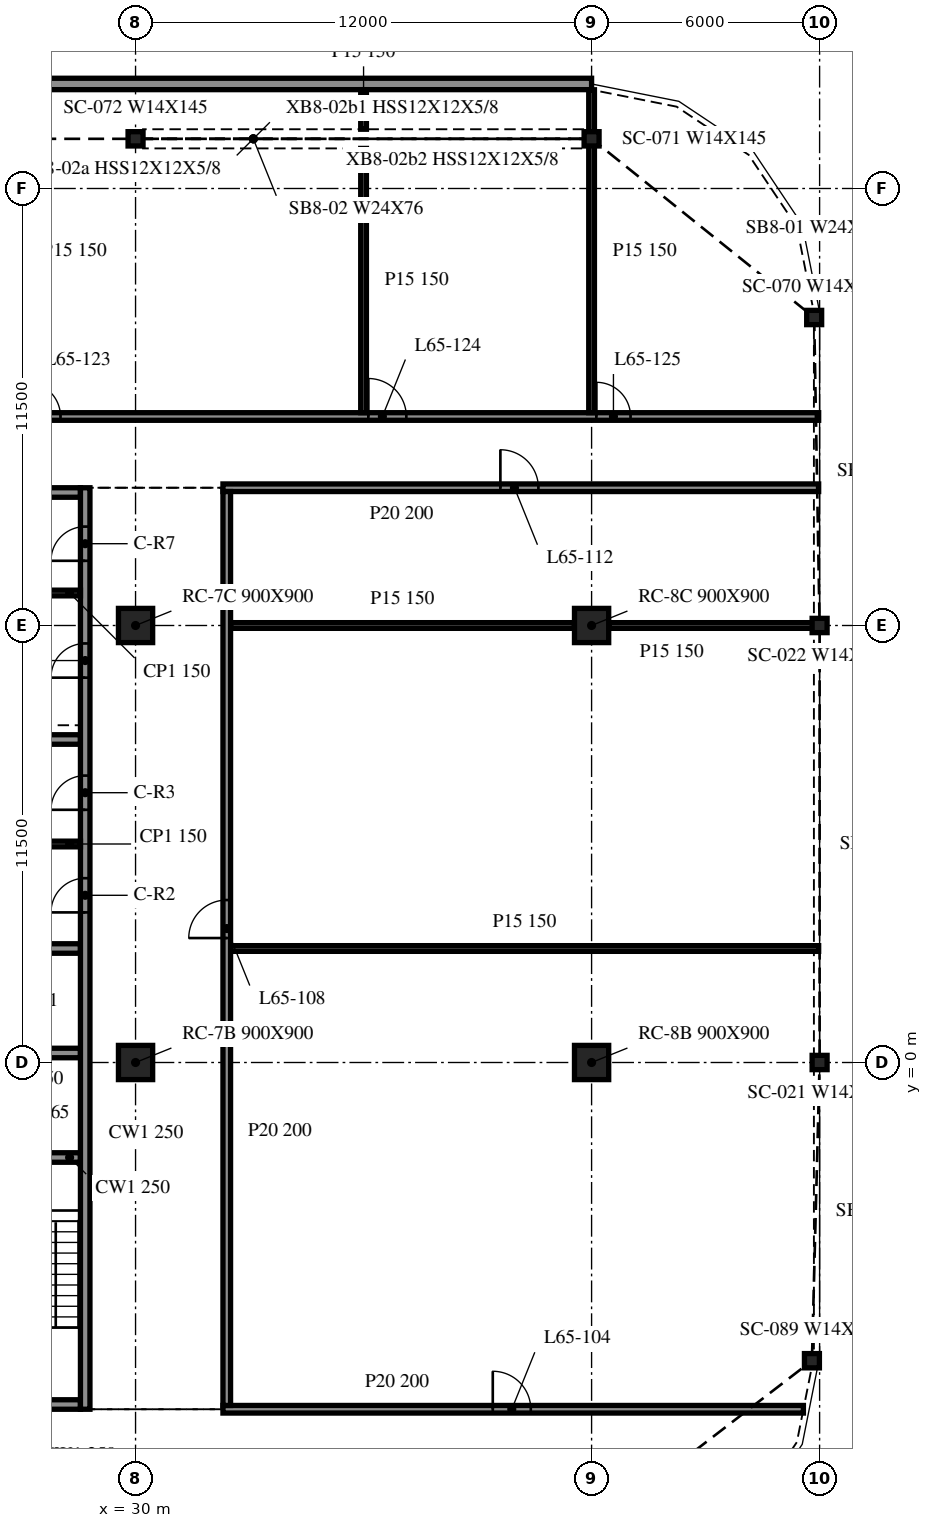
"""IFC4 building model, lengths in metres.
Left out: names, types, materials, properties, quantities, classifications, styles, units other than length and angle.
Written with IfcOpenShell. Run it as: python <this file> out.ifc"""

import sys

from ifc_helpers import new_model, si_unit, direction, frame, frame_2d, origin, origin_2d, place, context, subcontext, project, spatial, rectangle, i_section, extrude, element, fill, save


model = new_model("IFC4")
c1 = context("Model", 3, precision=1e-05, world=origin(), true_north=direction((0.0, 1.0)))
c2 = subcontext(c1, "Body", "Model", "MODEL_VIEW")
j1 = project(units=[si_unit("LENGTHUNIT", "METRE"), si_unit("PLANEANGLEUNIT", "RADIAN")], contexts=[c1])
p1 = place(None, origin())
s1 = spatial("IfcSite", under=j1, at=p1, CompositionType="ELEMENT")
p2 = place(p1, origin())
s2 = spatial("IfcBuilding", under=s1, at=p2, CompositionType="ELEMENT")
p3 = place(p2, frame((0.0, 0.0, 267.1)))
s3 = spatial("IfcBuildingStorey", under=s2, at=p3, CompositionType="ELEMENT", Elevation=267.1)
for number, where, z_axis, x_axis in (
    (1, (30.0, 0.0, -0.34), (0.0, 0.0, 1.0), (1.0, 0.0, 0.0)),
    (2, (30.0, 11.5, -0.34), (0.0, 0.0, 1.0), (1.0, 0.0, 0.0)),
    (3, (42.0, 0.0, -0.34), (0.0, 0.0, 1.0), (1.0, 0.0, 0.0)),
    (4, (42.0, 11.5, -0.34), (0.0, 0.0, 1.0), (1.0, 0.0, 0.0)),
):
    element("IfcColumn", number, at=place(p3, frame(where, z_axis=z_axis, x_axis=x_axis)), inside=s3, PredefinedType="COLUMN", context=c2, shape_type="SweptSolid", body=[
        extrude(rectangle(XDim=0.9, YDim=0.9, at=origin_2d()), origin(), (0.0, 0.0, 1.0), 3.8),
    ])
for number, where, z_axis, x_axis in (
    (5, (47.857, 19.605, -0.34), (0.0, 0.0, 1.0), (1.0, 0.0, 0.0)),
    (6, (42.0, 24.307, -0.34), (0.0, 0.0, 1.0), (1.0, 0.0, 0.0)),
    (7, (30.0, 24.307, -0.34), (0.0, 0.0, 1.0), (1.0, 0.0, 0.0)),
    (8, (47.798, -7.848, -0.34), (0.0, 0.0, 1.0), (1.0, 0.0, 0.0)),
    (9, (48.0, 0.0, -0.34), (0.0, 0.0, 1.0), (1.0, 0.0, 0.0)),
    (10, (48.0, 11.5, -0.34), (0.0, 0.0, 1.0), (1.0, 0.0, 0.0)),
):
    element("IfcColumn", number, at=place(p3, frame(where, z_axis=z_axis, x_axis=x_axis)), inside=s3, PredefinedType="COLUMN", context=c2, shape_type="SweptSolid", body=[
        extrude(i_section(OverallWidth=0.394, OverallDepth=0.376, WebThickness=0.017, FlangeThickness=0.028, at=origin_2d()), origin(), (0.0, 0.0, 1.0), 3.8),
    ])
p4 = place(p3, frame((42.0, 25.751, 0.0), z_axis=(0.0, 0.0, 1.0), x_axis=(-1.0, 0.0, 0.0)))
e11 = element("IfcWall", 11, at=p4, inside=s3, PredefinedType="NOTDEFINED", context=c2, shape_type="SweptSolid", body=[
    extrude(rectangle(XDim=84.0, YDim=0.3, at=frame_2d((42.0, 0.0))), origin(), (0.0, 0.0, 1.0), 2.853),
])
p5 = place(p3, frame((28.675, -9.125, 0.0), z_axis=(0.0, 0.0, 1.0), x_axis=(0.0, 1.0, 0.0)))
e12 = element("IfcWall", 12, at=p5, inside=s3, PredefinedType="SOLIDWALL", context=c2, shape_type="SweptSolid", body=[
    extrude(rectangle(XDim=24.25, YDim=0.25, at=frame_2d((12.125, 0.0))), origin(), (0.0, 0.0, 1.0), 3.46),
])
p6 = place(p5, frame((13.075, 0.0, 0.0)))
e13 = element("IfcOpeningElement", 13, at=p6, cuts=e12, PredefinedType="OPENING", context=c2, shape_type="SweptSolid", body=[
    extrude(rectangle(XDim=0.9, YDim=2.1, at=frame_2d((0.45, 1.05))), frame((0.0, 0.135, 0.0), z_axis=(0.0, -1.0, 0.0), x_axis=(1.0, 0.0, 0.0)), (0.0, 0.0, 1.0), 0.27),
])
p7 = place(p5, frame((15.775, 0.0, 0.0)))
e14 = element("IfcOpeningElement", 14, at=p7, cuts=e12, PredefinedType="OPENING", context=c2, shape_type="SweptSolid", body=[
    extrude(rectangle(XDim=0.9, YDim=2.1, at=frame_2d((0.45, 1.05))), frame((0.0, 0.135, 0.0), z_axis=(0.0, -1.0, 0.0), x_axis=(1.0, 0.0, 0.0)), (0.0, 0.0, 1.0), 0.27),
])
p8 = place(p5, frame((19.252, 0.0, 0.0)))
e15 = element("IfcOpeningElement", 15, at=p8, cuts=e12, PredefinedType="OPENING", context=c2, shape_type="SweptSolid", body=[
    extrude(rectangle(XDim=0.9, YDim=2.1, at=frame_2d((0.45, 1.05))), frame((0.0, 0.135, 0.0), z_axis=(0.0, -1.0, 0.0), x_axis=(1.0, 0.0, 0.0)), (0.0, 0.0, 1.0), 0.27),
])
p9 = place(p5, frame((22.327, 0.0, 0.0)))
e16 = element("IfcOpeningElement", 16, at=p9, cuts=e12, PredefinedType="OPENING", context=c2, shape_type="SweptSolid", body=[
    extrude(rectangle(XDim=0.9, YDim=2.1, at=frame_2d((0.45, 1.05))), frame((0.0, 0.135, 0.0), z_axis=(0.0, -1.0, 0.0), x_axis=(1.0, 0.0, 0.0)), (0.0, 0.0, 1.0), 0.27),
])
p10 = place(p3, frame((28.55, -9.0, 0.0), z_axis=(0.0, 0.0, 1.0), x_axis=(-1.0, 0.0, 0.0)))
e17 = element("IfcWall", 17, at=p10, inside=s3, PredefinedType="SOLIDWALL", context=c2, shape_type="SweptSolid", body=[
    extrude(rectangle(XDim=9.1, YDim=0.25, at=frame_2d((4.55, 0.0))), origin(), (0.0, 0.0, 1.0), 3.46),
])
p11 = place(p10, frame((3.65, 0.0, 0.0)))
e18 = element("IfcOpeningElement", 18, at=p11, cuts=e17, PredefinedType="OPENING", context=c2, shape_type="SweptSolid", body=[
    extrude(rectangle(XDim=1.8, YDim=2.1, at=frame_2d((0.9, 1.05))), frame((0.0, 0.135, 0.0), z_axis=(0.0, -1.0, 0.0), x_axis=(1.0, 0.0, 0.0)), (0.0, 0.0, 1.0), 0.27),
])
p12 = place(p3, frame((19.45, 15.0, 0.0), z_axis=(0.0, 0.0, 1.0), x_axis=(1.0, 0.0, 0.0)))
e19 = element("IfcWall", 19, at=p12, inside=s3, PredefinedType="SOLIDWALL", context=c2, shape_type="SweptSolid", body=[
    extrude(rectangle(XDim=9.1, YDim=0.25, at=frame_2d((4.55, 0.0))), origin(), (0.0, 0.0, 1.0), 3.46),
])
p13 = place(p12, frame((3.65, 0.0, 0.0)))
e20 = element("IfcOpeningElement", 20, at=p13, cuts=e19, PredefinedType="OPENING", context=c2, shape_type="SweptSolid", body=[
    extrude(rectangle(XDim=1.8, YDim=2.1, at=frame_2d((0.9, 1.05))), frame((0.0, 0.135, 0.0), z_axis=(0.0, -1.0, 0.0), x_axis=(1.0, 0.0, 0.0)), (0.0, 0.0, 1.0), 0.27),
])
for number, where, z_axis, x_axis in (
    (21, (25.7, -2.5, 0.0), (0.0, 0.0, 1.0), (1.0, 0.0, 0.0)),
    (22, (25.7, 0.25, 0.0), (0.0, 0.0, 1.0), (1.0, 0.0, 0.0)),
    (23, (25.7, 3.0, 0.0), (0.0, 0.0, 1.0), (1.0, 0.0, 0.0)),
    (24, (25.7, 8.5, 0.0), (0.0, 0.0, 1.0), (1.0, 0.0, 0.0)),
):
    element("IfcWall", number, at=place(p3, frame(where, z_axis=z_axis, x_axis=x_axis)), inside=s3, PredefinedType="SOLIDWALL", context=c2, shape_type="SweptSolid", body=[
        extrude(rectangle(XDim=2.85, YDim=0.25, at=frame_2d((1.425, 0.0))), origin(), (0.0, 0.0, 1.0), 3.46),
    ])
for number, where, z_axis, x_axis in (
    (25, (25.7, 5.75, 0.0), (0.0, 0.0, 1.0), (1.0, 0.0, 0.0)),
    (26, (25.7, 12.355, 0.0), (0.0, 0.0, 1.0), (1.0, 0.0, 0.0)),
):
    element("IfcWall", number, at=place(p3, frame(where, z_axis=z_axis, x_axis=x_axis)), inside=s3, PredefinedType="PARTITIONING", context=c2, shape_type="SweptSolid", body=[
        extrude(rectangle(XDim=2.85, YDim=0.15, at=frame_2d((1.425, 0.0))), origin(), (0.0, 0.0, 1.0), 3.46),
    ])
p14 = place(p3, frame((32.3, -9.125, 0.0), z_axis=(0.0, 0.0, 1.0), x_axis=(1.0, 0.0, 0.0)))
e27 = element("IfcWall", 27, at=p14, inside=s3, PredefinedType="PARTITIONING", context=c2, shape_type="SweptSolid", body=[
    extrude(rectangle(XDim=15.274, YDim=0.2, at=frame_2d((7.637, 0.0))), origin(), (0.0, 0.0, 1.0), 3.46),
])
p15 = place(p14, frame((7.1, 0.0, 0.0)))
e28 = element("IfcOpeningElement", 28, at=p15, cuts=e27, PredefinedType="OPENING", context=c2, shape_type="SweptSolid", body=[
    extrude(rectangle(XDim=1.0, YDim=2.1, at=frame_2d((0.5, 1.05))), frame((0.0, 0.11, 0.0), z_axis=(0.0, -1.0, 0.0), x_axis=(1.0, 0.0, 0.0)), (0.0, 0.0, 1.0), 0.22),
])
p16 = place(p3, frame((32.5, 3.0, 0.0), z_axis=(0.0, 0.0, 1.0), x_axis=(1.0, 0.0, 0.0)))
e29 = element("IfcWall", 29, at=p16, inside=s3, PredefinedType="PARTITIONING", context=c2, shape_type="SweptSolid", body=[
    extrude(rectangle(XDim=15.475, YDim=0.15, at=frame_2d((7.738, 0.0))), origin(), (0.0, 0.0, 1.0), 3.46),
])
p17 = place(p3, frame((32.5, 11.5, 0.0), z_axis=(0.0, 0.0, 1.0), x_axis=(1.0, 0.0, 0.0)))
e30 = element("IfcWall", 30, at=p17, inside=s3, PredefinedType="PARTITIONING", context=c2, shape_type="SweptSolid", body=[
    extrude(rectangle(XDim=9.05, YDim=0.15, at=frame_2d((4.525, 0.0))), origin(), (0.0, 0.0, 1.0), 3.46),
])
p18 = place(p3, frame((42.45, 11.5, 0.0), z_axis=(0.0, 0.0, 1.0), x_axis=(1.0, 0.0, 0.0)))
e31 = element("IfcWall", 31, at=p18, inside=s3, PredefinedType="PARTITIONING", context=c2, shape_type="SweptSolid", body=[
    extrude(rectangle(XDim=5.525, YDim=0.15, at=frame_2d((2.763, 0.0))), origin(), (0.0, 0.0, 1.0), 3.46),
])
p19 = place(p3, frame((32.3, 15.125, 0.0), z_axis=(0.0, 0.0, 1.0), x_axis=(1.0, 0.0, 0.0)))
e32 = element("IfcWall", 32, at=p19, inside=s3, PredefinedType="PARTITIONING", context=c2, shape_type="SweptSolid", body=[
    extrude(rectangle(XDim=15.675, YDim=0.2, at=frame_2d((7.837, 0.0))), origin(), (0.0, 0.0, 1.0), 3.46),
])
p20 = place(p19, frame((7.3, 0.0, 0.0)))
e33 = element("IfcOpeningElement", 33, at=p20, cuts=e32, PredefinedType="OPENING", context=c2, shape_type="SweptSolid", body=[
    extrude(rectangle(XDim=1.0, YDim=2.1, at=frame_2d((0.5, 1.05))), frame((0.0, 0.11, 0.0), z_axis=(0.0, -1.0, 0.0), x_axis=(1.0, 0.0, 0.0)), (0.0, 0.0, 1.0), 0.22),
])
p21 = place(p3, frame((-47.975, 17.0, 0.0), z_axis=(0.0, 0.0, 1.0), x_axis=(1.0, 0.0, 0.0)))
e34 = element("IfcWall", 34, at=p21, inside=s3, PredefinedType="PARTITIONING", context=c2, shape_type="SweptSolid", body=[
    extrude(rectangle(XDim=95.95, YDim=0.2, at=frame_2d((47.975, 0.0))), origin(), (0.0, 0.0, 1.0), 3.46),
])
p22 = place(p21, frame((10.7, 0.0, 0.0)))
e35 = element("IfcOpeningElement", 35, at=p22, cuts=e34, PredefinedType="OPENING", context=c2, shape_type="SweptSolid", body=[
    extrude(rectangle(XDim=0.9, YDim=2.1, at=frame_2d((0.45, 1.05))), frame((0.0, 0.11, 0.0), z_axis=(0.0, -1.0, 0.0), x_axis=(1.0, 0.0, 0.0)), (0.0, 0.0, 1.0), 0.22),
])
p23 = place(p21, frame((13.7, 0.0, 0.0)))
e36 = element("IfcOpeningElement", 36, at=p23, cuts=e34, PredefinedType="OPENING", context=c2, shape_type="SweptSolid", body=[
    extrude(rectangle(XDim=0.9, YDim=2.1, at=frame_2d((0.45, 1.05))), frame((0.0, 0.11, 0.0), z_axis=(0.0, -1.0, 0.0), x_axis=(1.0, 0.0, 0.0)), (0.0, 0.0, 1.0), 0.22),
])
p24 = place(p21, frame((22.5, 0.0, 0.0)))
e37 = element("IfcOpeningElement", 37, at=p24, cuts=e34, PredefinedType="OPENING", context=c2, shape_type="SweptSolid", body=[
    extrude(rectangle(XDim=1.0, YDim=2.1, at=frame_2d((0.5, 1.05))), frame((0.0, 0.11, 0.0), z_axis=(0.0, -1.0, 0.0), x_axis=(1.0, 0.0, 0.0)), (0.0, 0.0, 1.0), 0.22),
])
p25 = place(p21, frame((28.5, 0.0, 0.0)))
e38 = element("IfcOpeningElement", 38, at=p25, cuts=e34, PredefinedType="OPENING", context=c2, shape_type="SweptSolid", body=[
    extrude(rectangle(XDim=1.0, YDim=2.1, at=frame_2d((0.5, 1.05))), frame((0.0, 0.11, 0.0), z_axis=(0.0, -1.0, 0.0), x_axis=(1.0, 0.0, 0.0)), (0.0, 0.0, 1.0), 0.22),
])
p26 = place(p21, frame((40.7, 0.0, 0.0)))
e39 = element("IfcOpeningElement", 39, at=p26, cuts=e34, PredefinedType="OPENING", context=c2, shape_type="SweptSolid", body=[
    extrude(rectangle(XDim=0.9, YDim=2.1, at=frame_2d((0.45, 1.05))), frame((0.0, 0.11, 0.0), z_axis=(0.0, -1.0, 0.0), x_axis=(1.0, 0.0, 0.0)), (0.0, 0.0, 1.0), 0.22),
])
p27 = place(p21, frame((43.5, 0.0, 0.0)))
e40 = element("IfcOpeningElement", 40, at=p27, cuts=e34, PredefinedType="OPENING", context=c2, shape_type="SweptSolid", body=[
    extrude(rectangle(XDim=1.0, YDim=2.1, at=frame_2d((0.5, 1.05))), frame((0.0, 0.11, 0.0), z_axis=(0.0, -1.0, 0.0), x_axis=(1.0, 0.0, 0.0)), (0.0, 0.0, 1.0), 0.22),
])
p28 = place(p21, frame((47.3, 0.0, 0.0)))
e41 = element("IfcOpeningElement", 41, at=p28, cuts=e34, PredefinedType="OPENING", context=c2, shape_type="SweptSolid", body=[
    extrude(rectangle(XDim=0.9, YDim=2.1, at=frame_2d((0.45, 1.05))), frame((0.0, 0.11, 0.0), z_axis=(0.0, -1.0, 0.0), x_axis=(1.0, 0.0, 0.0)), (0.0, 0.0, 1.0), 0.22),
])
p29 = place(p21, frame((54.1, 0.0, 0.0)))
e42 = element("IfcOpeningElement", 42, at=p29, cuts=e34, PredefinedType="OPENING", context=c2, shape_type="SweptSolid", body=[
    extrude(rectangle(XDim=0.9, YDim=2.1, at=frame_2d((0.45, 1.05))), frame((0.0, 0.11, 0.0), z_axis=(0.0, -1.0, 0.0), x_axis=(1.0, 0.0, 0.0)), (0.0, 0.0, 1.0), 0.22),
])
p30 = place(p21, frame((60.1, 0.0, 0.0)))
e43 = element("IfcOpeningElement", 43, at=p30, cuts=e34, PredefinedType="OPENING", context=c2, shape_type="SweptSolid", body=[
    extrude(rectangle(XDim=1.0, YDim=2.1, at=frame_2d((0.5, 1.05))), frame((0.0, 0.11, 0.0), z_axis=(0.0, -1.0, 0.0), x_axis=(1.0, 0.0, 0.0)), (0.0, 0.0, 1.0), 0.22),
])
p31 = place(p21, frame((72.1, 0.0, 0.0)))
e44 = element("IfcOpeningElement", 44, at=p31, cuts=e34, PredefinedType="OPENING", context=c2, shape_type="SweptSolid", body=[
    extrude(rectangle(XDim=1.0, YDim=2.1, at=frame_2d((0.5, 1.05))), frame((0.0, 0.11, 0.0), z_axis=(0.0, -1.0, 0.0), x_axis=(1.0, 0.0, 0.0)), (0.0, 0.0, 1.0), 0.22),
])
p32 = place(p21, frame((75.1, 0.0, 0.0)))
e45 = element("IfcOpeningElement", 45, at=p32, cuts=e34, PredefinedType="OPENING", context=c2, shape_type="SweptSolid", body=[
    extrude(rectangle(XDim=0.9, YDim=2.1, at=frame_2d((0.45, 1.05))), frame((0.0, 0.11, 0.0), z_axis=(0.0, -1.0, 0.0), x_axis=(1.0, 0.0, 0.0)), (0.0, 0.0, 1.0), 0.22),
])
p33 = place(p21, frame((84.1, 0.0, 0.0)))
e46 = element("IfcOpeningElement", 46, at=p33, cuts=e34, PredefinedType="OPENING", context=c2, shape_type="SweptSolid", body=[
    extrude(rectangle(XDim=1.0, YDim=2.1, at=frame_2d((0.5, 1.05))), frame((0.0, 0.11, 0.0), z_axis=(0.0, -1.0, 0.0), x_axis=(1.0, 0.0, 0.0)), (0.0, 0.0, 1.0), 0.22),
])
p34 = place(p21, frame((90.1, 0.0, 0.0)))
e47 = element("IfcOpeningElement", 47, at=p34, cuts=e34, PredefinedType="OPENING", context=c2, shape_type="SweptSolid", body=[
    extrude(rectangle(XDim=0.9, YDim=2.1, at=frame_2d((0.45, 1.05))), frame((0.0, 0.11, 0.0), z_axis=(0.0, -1.0, 0.0), x_axis=(1.0, 0.0, 0.0)), (0.0, 0.0, 1.0), 0.22),
])
p35 = place(p3, frame((32.4, -9.025, 0.0), z_axis=(0.0, 0.0, 1.0), x_axis=(0.0, 1.0, 0.0)))
e48 = element("IfcWall", 48, at=p35, inside=s3, PredefinedType="PARTITIONING", context=c2, shape_type="SweptSolid", body=[
    extrude(rectangle(XDim=24.05, YDim=0.2, at=frame_2d((12.025, 0.0))), origin(), (0.0, 0.0, 1.0), 3.46),
])
p36 = place(p35, frame((12.3, 0.0, 0.0)))
e49 = element("IfcOpeningElement", 49, at=p36, cuts=e48, PredefinedType="OPENING", context=c2, shape_type="SweptSolid", body=[
    extrude(rectangle(XDim=1.0, YDim=2.1, at=frame_2d((0.5, 1.05))), frame((0.0, 0.11, 0.0), z_axis=(0.0, -1.0, 0.0), x_axis=(1.0, 0.0, 0.0)), (0.0, 0.0, 1.0), 0.22),
])
p37 = place(p3, frame((36.0, 17.1, 0.0), z_axis=(0.0, 0.0, 1.0), x_axis=(0.0, 1.0, 0.0)))
e50 = element("IfcWall", 50, at=p37, inside=s3, PredefinedType="PARTITIONING", context=c2, shape_type="SweptSolid", body=[
    extrude(rectangle(XDim=6.955, YDim=0.15, at=frame_2d((3.477, 0.0))), origin(), (0.0, 0.0, 1.0), 3.46),
])
p38 = place(p3, frame((36.0, 24.559, 0.0), z_axis=(0.0, 0.0, 1.0), x_axis=(0.0, 1.0, 0.0)))
e51 = element("IfcWall", 51, at=p38, inside=s3, PredefinedType="PARTITIONING", context=c2, shape_type="SweptSolid", body=[
    extrude(rectangle(XDim=1.042, YDim=0.15, at=frame_2d((0.521, 0.0))), origin(), (0.0, 0.0, 1.0), 3.46),
])
p39 = place(p3, frame((42.0, 17.1, 0.0), z_axis=(0.0, 0.0, 1.0), x_axis=(0.0, 1.0, 0.0)))
e52 = element("IfcWall", 52, at=p39, inside=s3, PredefinedType="PARTITIONING", context=c2, shape_type="SweptSolid", body=[
    extrude(rectangle(XDim=8.498, YDim=0.15, at=frame_2d((4.249, 0.0))), origin(), (0.0, 0.0, 1.0), 3.46),
])
p40 = place(p6, origin())
e53 = element("IfcDoor", 53, at=p40, inside=s3, OperationType="SINGLE_SWING_RIGHT", PredefinedType="DOOR", context=c2, shape_type="SweptSolid", body=[
    extrude(rectangle(XDim=0.9, YDim=2.1, at=frame_2d((0.45, 1.05))), frame((0.0, 0.025, 0.0), z_axis=(0.0, -1.0, 0.0), x_axis=(1.0, 0.0, 0.0)), (0.0, 0.0, 1.0), 0.05),
])
fill(e13, e53)
p41 = place(p7, origin())
e54 = element("IfcDoor", 54, at=p41, inside=s3, OperationType="SINGLE_SWING_LEFT", PredefinedType="DOOR", context=c2, shape_type="SweptSolid", body=[
    extrude(rectangle(XDim=0.9, YDim=2.1, at=frame_2d((0.45, 1.05))), frame((0.0, 0.025, 0.0), z_axis=(0.0, -1.0, 0.0), x_axis=(1.0, 0.0, 0.0)), (0.0, 0.0, 1.0), 0.05),
])
fill(e14, e54)
p42 = place(p8, origin())
e55 = element("IfcDoor", 55, at=p42, inside=s3, OperationType="SINGLE_SWING_RIGHT", PredefinedType="DOOR", context=c2, shape_type="SweptSolid", body=[
    extrude(rectangle(XDim=0.9, YDim=2.1, at=frame_2d((0.45, 1.05))), frame((0.0, 0.025, 0.0), z_axis=(0.0, -1.0, 0.0), x_axis=(1.0, 0.0, 0.0)), (0.0, 0.0, 1.0), 0.05),
])
fill(e15, e55)
p43 = place(p9, origin())
e56 = element("IfcDoor", 56, at=p43, inside=s3, OperationType="SINGLE_SWING_LEFT", PredefinedType="DOOR", context=c2, shape_type="SweptSolid", body=[
    extrude(rectangle(XDim=0.9, YDim=2.1, at=frame_2d((0.45, 1.05))), frame((0.0, 0.025, 0.0), z_axis=(0.0, -1.0, 0.0), x_axis=(1.0, 0.0, 0.0)), (0.0, 0.0, 1.0), 0.05),
])
fill(e16, e56)
p44 = place(p15, origin())
e57 = element("IfcDoor", 57, at=p44, inside=s3, OperationType="SINGLE_SWING_LEFT", PredefinedType="DOOR", context=c2, shape_type="SweptSolid", body=[
    extrude(rectangle(XDim=1.0, YDim=2.1, at=frame_2d((0.5, 1.05))), frame((0.0, 0.025, 0.0), z_axis=(0.0, -1.0, 0.0), x_axis=(1.0, 0.0, 0.0)), (0.0, 0.0, 1.0), 0.05),
])
fill(e28, e57)
p45 = place(p36, origin())
e58 = element("IfcDoor", 58, at=p45, inside=s3, OperationType="SINGLE_SWING_LEFT", PredefinedType="DOOR", context=c2, shape_type="SweptSolid", body=[
    extrude(rectangle(XDim=1.0, YDim=2.1, at=frame_2d((0.5, 1.05))), frame((0.0, 0.025, 0.0), z_axis=(0.0, -1.0, 0.0), x_axis=(1.0, 0.0, 0.0)), (0.0, 0.0, 1.0), 0.05),
])
fill(e49, e58)
p46 = place(p20, origin())
e59 = element("IfcDoor", 59, at=p46, inside=s3, OperationType="SINGLE_SWING_LEFT", PredefinedType="DOOR", context=c2, shape_type="SweptSolid", body=[
    extrude(rectangle(XDim=1.0, YDim=2.1, at=frame_2d((0.5, 1.05))), frame((0.0, 0.025, 0.0), z_axis=(0.0, -1.0, 0.0), x_axis=(1.0, 0.0, 0.0)), (0.0, 0.0, 1.0), 0.05),
])
fill(e33, e59)
p47 = place(p32, origin())
e60 = element("IfcDoor", 60, at=p47, inside=s3, OperationType="SINGLE_SWING_RIGHT", PredefinedType="DOOR", context=c2, shape_type="SweptSolid", body=[
    extrude(rectangle(XDim=0.9, YDim=2.1, at=frame_2d((0.45, 1.05))), frame((0.0, 0.025, 0.0), z_axis=(0.0, -1.0, 0.0), x_axis=(1.0, 0.0, 0.0)), (0.0, 0.0, 1.0), 0.05),
])
fill(e45, e60)
p48 = place(p33, origin())
e61 = element("IfcDoor", 61, at=p48, inside=s3, OperationType="SINGLE_SWING_RIGHT", PredefinedType="DOOR", context=c2, shape_type="SweptSolid", body=[
    extrude(rectangle(XDim=1.0, YDim=2.1, at=frame_2d((0.5, 1.05))), frame((0.0, 0.025, 0.0), z_axis=(0.0, -1.0, 0.0), x_axis=(1.0, 0.0, 0.0)), (0.0, 0.0, 1.0), 0.05),
])
fill(e46, e61)
p49 = place(p34, origin())
e62 = element("IfcDoor", 62, at=p49, inside=s3, OperationType="SINGLE_SWING_RIGHT", PredefinedType="DOOR", context=c2, shape_type="SweptSolid", body=[
    extrude(rectangle(XDim=0.9, YDim=2.1, at=frame_2d((0.45, 1.05))), frame((0.0, 0.025, 0.0), z_axis=(0.0, -1.0, 0.0), x_axis=(1.0, 0.0, 0.0)), (0.0, 0.0, 1.0), 0.05),
])
fill(e47, e62)
save(model, sys.argv[1])
